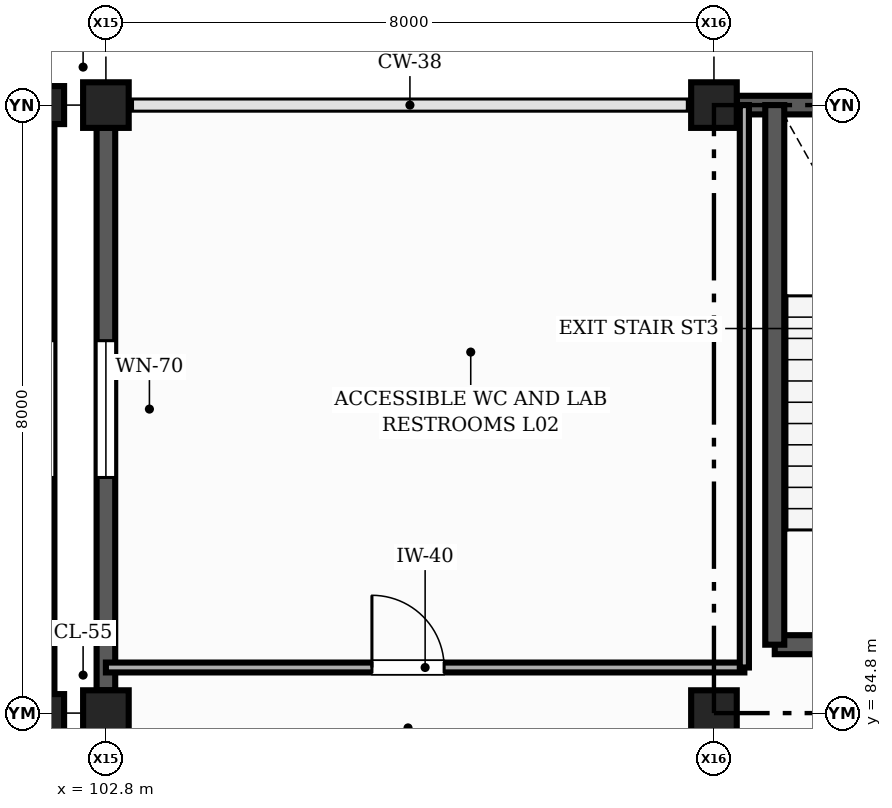
"""IFC4 building model, lengths in metres.
Left out: names, types, materials, properties, quantities, classifications, styles, units other than length and angle.
Written with IfcOpenShell. Run it as: python <this file> out.ifc"""

import sys

from ifc_helpers import new_model, si_unit, direction, frame, frame_2d, origin, origin_2d, place, context, subcontext, project, spatial, rectangle, extrude, element, fill, save


model = new_model("IFC4")
c1 = context("Model", 3, precision=1e-05, world=origin(), true_north=direction((0.0, 1.0)))
c2 = subcontext(c1, "Body", "Model", "MODEL_VIEW")
j1 = project(units=[si_unit("LENGTHUNIT", "METRE"), si_unit("PLANEANGLEUNIT", "RADIAN")], contexts=[c1])
p1 = place(None, origin())
s1 = spatial("IfcSite", under=j1, at=p1, CompositionType="ELEMENT")
p2 = place(p1, origin())
s2 = spatial("IfcBuilding", under=s1, at=p2, CompositionType="ELEMENT")
p3 = place(p2, frame((0.0, 0.0, 9.0)))
s3 = spatial("IfcBuildingStorey", under=s2, at=p3, CompositionType="ELEMENT", Elevation=9.0)
for number, where, z_axis, x_axis in (
    (1, (102.0, 84.8, 0.0), (0.0, 0.0, 1.0), (1.0, 0.0, 0.0)),
    (2, (102.0, 92.8, 0.0), (0.0, 0.0, 1.0), (1.0, 0.0, 0.0)),
):
    element("IfcColumn", number, at=place(p3, frame(where, z_axis=z_axis, x_axis=x_axis)), inside=s3, PredefinedType="COLUMN", context=c2, shape_type="SweptSolid", body=[
        extrude(rectangle(XDim=0.5, YDim=0.5, at=origin_2d()), origin(), (0.0, 0.0, 1.0), 4.5),
    ])
for number, where, z_axis, x_axis in (
    (3, (102.8, 84.8, 0.0), (0.0, 0.0, 1.0), (1.0, 0.0, 0.0)),
    (4, (102.8, 92.8, 0.0), (0.0, 0.0, 1.0), (1.0, 0.0, 0.0)),
    (5, (110.8, 84.8, 0.0), (0.0, 0.0, 1.0), (1.0, 0.0, 0.0)),
    (6, (110.8, 92.8, 0.0), (0.0, 0.0, 1.0), (1.0, 0.0, 0.0)),
):
    element("IfcColumn", number, at=place(p3, frame(where, z_axis=z_axis, x_axis=x_axis)), inside=s3, PredefinedType="COLUMN", context=c2, shape_type="SweptSolid", body=[
        extrude(rectangle(XDim=0.6, YDim=0.6, at=origin_2d()), origin(), (0.0, 0.0, 1.0), 4.5),
    ])
p4 = place(p3, frame((102.0, 85.05, 0.0), z_axis=(0.0, 0.0, 1.0), x_axis=(0.0, 1.0, 0.0)))
e7 = element("IfcWall", 7, at=p4, inside=s3, PredefinedType="SOLIDWALL", context=c2, shape_type="SweptSolid", body=[
    extrude(rectangle(XDim=7.5, YDim=0.245, at=frame_2d((3.75, 0.0))), origin(), (0.0, 0.0, 1.0), 3.57),
])
p5 = place(p4, frame((2.85, 0.0, 0.9)))
e8 = element("IfcOpeningElement", 8, at=p5, cuts=e7, PredefinedType="OPENING", context=c2, shape_type="SweptSolid", body=[
    extrude(rectangle(XDim=1.8, YDim=1.4, at=frame_2d((0.9, 0.7))), frame((0.0, 0.133, 0.0), z_axis=(0.0, -1.0, 0.0), x_axis=(1.0, 0.0, 0.0)), (0.0, 0.0, 1.0), 0.265),
])
p6 = place(p3, frame((118.5, 92.8, 0.0), z_axis=(0.0, 0.0, 1.0), x_axis=(-1.0, 0.0, 0.0)))
e9 = element("IfcWall", 9, at=p6, inside=s3, PredefinedType="SOLIDWALL", context=c2, shape_type="SweptSolid", body=[
    extrude(rectangle(XDim=7.4, YDim=0.245, at=frame_2d((3.7, 0.0))), origin(), (0.0, 0.0, 1.0), 4.22),
])
p7 = place(p3, frame((102.8, 92.5, 0.0), z_axis=(0.0, 0.0, 1.0), x_axis=(0.0, -1.0, 0.0)))
e10 = element("IfcWall", 10, at=p7, inside=s3, PredefinedType="SOLIDWALL", context=c2, shape_type="SweptSolid", body=[
    extrude(rectangle(XDim=7.4, YDim=0.245, at=frame_2d((3.7, 0.0))), origin(), (0.0, 0.0, 1.0), 3.57),
])
p8 = place(p7, frame((2.8, 0.0, 0.9)))
e11 = element("IfcOpeningElement", 11, at=p8, cuts=e10, PredefinedType="OPENING", context=c2, shape_type="SweptSolid", body=[
    extrude(rectangle(XDim=1.8, YDim=1.4, at=frame_2d((0.9, 0.7))), frame((0.0, 0.133, 0.0), z_axis=(0.0, -1.0, 0.0), x_axis=(1.0, 0.0, 0.0)), (0.0, 0.0, 1.0), 0.265),
])
p9 = place(p3, frame((111.6, 85.7, 0.0), z_axis=(0.0, 0.0, 1.0), x_axis=(1.0, 0.0, 0.0)))
e12 = element("IfcWall", 12, at=p9, inside=s3, PredefinedType="SHEAR", context=c2, shape_type="SweptSolid", body=[
    extrude(rectangle(XDim=3.22, YDim=0.25, at=frame_2d((1.61, 0.0))), origin(), (0.0, 0.0, 1.0), 4.5),
])
p10 = place(p9, frame((1.035, 0.0, 0.0)))
e13 = element("IfcOpeningElement", 13, at=p10, cuts=e12, PredefinedType="OPENING", context=c2, shape_type="SweptSolid", body=[
    extrude(rectangle(XDim=1.15, YDim=2.15, at=frame_2d((0.575, 1.075))), frame((0.0, 0.135, 0.0), z_axis=(0.0, -1.0, 0.0), x_axis=(1.0, 0.0, 0.0)), (0.0, 0.0, 1.0), 0.27),
])
p11 = place(p3, frame((111.6, 92.8, 0.0), z_axis=(0.0, 0.0, 1.0), x_axis=(0.0, -1.0, 0.0)))
e14 = element("IfcWall", 14, at=p11, inside=s3, PredefinedType="SHEAR", context=c2, shape_type="SweptSolid", body=[
    extrude(rectangle(XDim=7.1, YDim=0.25, at=frame_2d((3.55, 0.0))), origin(), (0.0, 0.0, 1.0), 4.5),
])
p12 = place(p3, frame((102.8, 85.4, 0.0), z_axis=(0.0, 0.0, 1.0), x_axis=(1.0, 0.0, 0.0)))
e15 = element("IfcWall", 15, at=p12, inside=s3, PredefinedType="PARTITIONING", context=c2, shape_type="SweptSolid", body=[
    extrude(rectangle(XDim=8.4, YDim=0.13, at=frame_2d((4.2, 0.0))), origin(), (0.0, 0.0, 1.0), 3.555),
])
p13 = place(p12, frame((3.5, 0.0, 0.0)))
e16 = element("IfcOpeningElement", 16, at=p13, cuts=e15, PredefinedType="OPENING", context=c2, shape_type="SweptSolid", body=[
    extrude(rectangle(XDim=0.95, YDim=2.15, at=frame_2d((0.475, 1.075))), frame((0.0, 0.075, 0.0), z_axis=(0.0, -1.0, 0.0), x_axis=(1.0, 0.0, 0.0)), (0.0, 0.0, 1.0), 0.15),
])
p14 = place(p3, frame((111.2, 85.4, 0.0), z_axis=(0.0, 0.0, 1.0), x_axis=(0.0, 1.0, 0.0)))
e17 = element("IfcWall", 17, at=p14, inside=s3, PredefinedType="PARTITIONING", context=c2, shape_type="SweptSolid", body=[
    extrude(rectangle(XDim=7.4, YDim=0.12, at=frame_2d((3.7, 0.0))), origin(), (0.0, 0.0, 1.0), 4.22),
])
p15 = place(p8, origin())
e18 = element("IfcWindow", 18, at=p15, inside=s3, PartitioningType="SINGLE_PANEL", PredefinedType="WINDOW", context=c2, shape_type="SweptSolid", body=[
    extrude(rectangle(XDim=1.8, YDim=1.4, at=frame_2d((0.9, 0.7))), frame((0.0, 0.03, 0.0), z_axis=(0.0, -1.0, 0.0), x_axis=(1.0, 0.0, 0.0)), (0.0, 0.0, 1.0), 0.06),
])
fill(e11, e18)
p16 = place(p13, origin())
e19 = element("IfcDoor", 19, at=p16, inside=s3, OperationType="SINGLE_SWING_LEFT", PredefinedType="DOOR", context=c2, shape_type="SweptSolid", body=[
    extrude(rectangle(XDim=0.95, YDim=2.15, at=frame_2d((0.475, 1.075))), frame((0.0, 0.025, 0.0), z_axis=(0.0, -1.0, 0.0), x_axis=(1.0, 0.0, 0.0)), (0.0, 0.0, 1.0), 0.05),
])
fill(e16, e19)
save(model, sys.argv[1])
